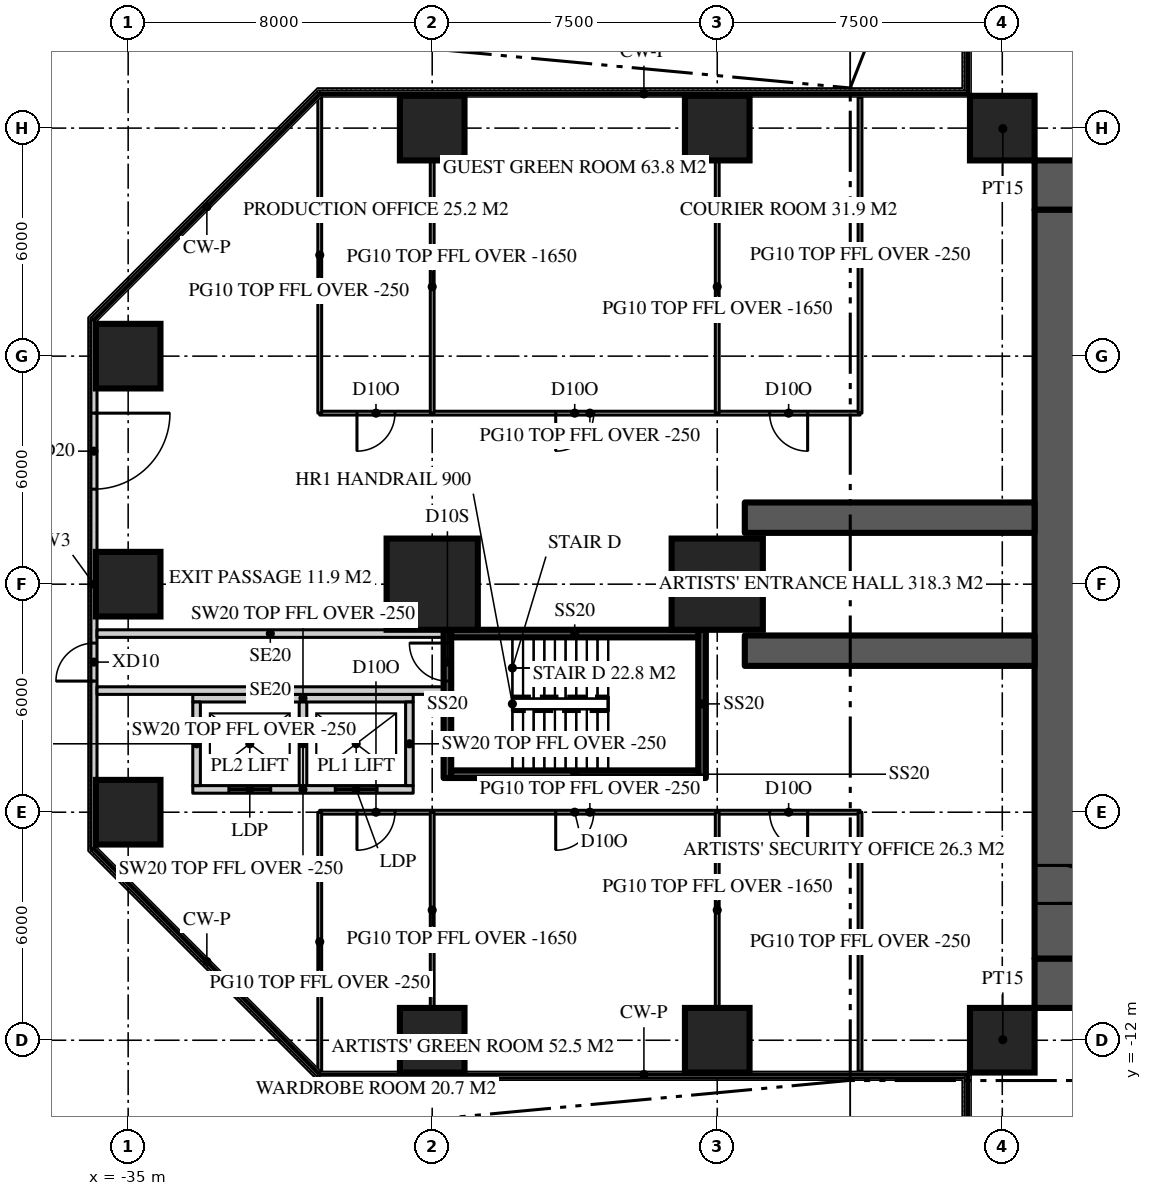
"""IFC4 building model, lengths in metres.
Left out: names, types, materials, properties, quantities, classifications, styles, units other than length and angle.
Written with IfcOpenShell. Run it as: python <this file> out.ifc"""

import sys

from ifc_helpers import new_model, si_unit, direction, frame, frame_2d, origin, origin_2d, place, context, subcontext, project, spatial, rectangle, extrude, element, fill, save


model = new_model("IFC4")
c1 = context("Model", 3, precision=1e-05, world=origin(), true_north=direction((0.0, 1.0)))
c2 = subcontext(c1, "Body", "Model", "MODEL_VIEW")
j1 = project(units=[si_unit("LENGTHUNIT", "METRE"), si_unit("PLANEANGLEUNIT", "RADIAN")], contexts=[c1])
p1 = place(None, origin())
s1 = spatial("IfcSite", under=j1, at=p1, CompositionType="ELEMENT")
p2 = place(p1, origin())
s2 = spatial("IfcBuilding", under=s1, at=p2, CompositionType="ELEMENT")
p3 = place(p2, origin())
s3 = spatial("IfcBuildingStorey", under=s2, at=p3, CompositionType="ELEMENT", Elevation=0.0)
p4 = place(p3, frame((-11.15, 10.5, 0.0), z_axis=(0.0, 0.0, 1.0), x_axis=(1.0, 0.0, 0.0)))
e1 = element("IfcWall", 1, at=p4, inside=s3, PredefinedType="SHEAR", context=c2, shape_type="SweptSolid", body=[
    extrude(rectangle(XDim=22.3, YDim=1.3, at=frame_2d((11.15, 0.0))), origin(), (0.0, 0.0, 1.0), 7.0),
])
p5 = place(p4, frame((4.25, 0.0, 0.0)))
e2 = element("IfcOpeningElement", 2, at=p5, cuts=e1, PredefinedType="OPENING", context=c2, shape_type="SweptSolid", body=[
    extrude(rectangle(XDim=1.8, YDim=2.2, at=frame_2d((0.9, 1.1))), frame((0.0, 0.66, 0.0), z_axis=(0.0, -1.0, 0.0), x_axis=(1.0, 0.0, 0.0)), (0.0, 0.0, 1.0), 1.32),
])
p6 = place(p4, frame((16.25, 0.0, 0.0)))
e3 = element("IfcOpeningElement", 3, at=p6, cuts=e1, PredefinedType="OPENING", context=c2, shape_type="SweptSolid", body=[
    extrude(rectangle(XDim=1.8, YDim=2.2, at=frame_2d((0.9, 1.1))), frame((0.0, 0.66, 0.0), z_axis=(0.0, -1.0, 0.0), x_axis=(1.0, 0.0, 0.0)), (0.0, 0.0, 1.0), 1.32),
])
p7 = place(p3, frame((11.15, -10.5, 0.0), z_axis=(0.0, 0.0, 1.0), x_axis=(-1.0, 0.0, 0.0)))
e4 = element("IfcWall", 4, at=p7, inside=s3, PredefinedType="SHEAR", context=c2, shape_type="SweptSolid", body=[
    extrude(rectangle(XDim=22.3, YDim=1.3, at=frame_2d((11.15, 0.0))), origin(), (0.0, 0.0, 1.0), 7.0),
])
p8 = place(p7, frame((16.25, 0.0, 0.0)))
e5 = element("IfcOpeningElement", 5, at=p8, cuts=e4, PredefinedType="OPENING", context=c2, shape_type="SweptSolid", body=[
    extrude(rectangle(XDim=1.8, YDim=2.2, at=frame_2d((0.9, 1.1))), frame((0.0, 0.66, 0.0), z_axis=(0.0, -1.0, 0.0), x_axis=(1.0, 0.0, 0.0)), (0.0, 0.0, 1.0), 1.32),
])
p9 = place(p7, frame((4.25, 0.0, 0.0)))
e6 = element("IfcOpeningElement", 6, at=p9, cuts=e4, PredefinedType="OPENING", context=c2, shape_type="SweptSolid", body=[
    extrude(rectangle(XDim=1.8, YDim=2.2, at=frame_2d((0.9, 1.1))), frame((0.0, 0.66, 0.0), z_axis=(0.0, -1.0, 0.0), x_axis=(1.0, 0.0, 0.0)), (0.0, 0.0, 1.0), 1.32),
])
p10 = place(p3, frame((-10.5, 9.85, 0.0), z_axis=(0.0, 0.0, 1.0), x_axis=(0.0, -1.0, 0.0)))
e7 = element("IfcWall", 7, at=p10, inside=s3, PredefinedType="SHEAR", context=c2, shape_type="SweptSolid", body=[
    extrude(rectangle(XDim=19.7, YDim=1.3, at=frame_2d((9.85, 0.0))), origin(), (0.0, 0.0, 1.0), 7.0),
])
p11 = place(p10, frame((17.25, 0.0, 0.0)))
e8 = element("IfcOpeningElement", 8, at=p11, cuts=e7, PredefinedType="OPENING", context=c2, shape_type="SweptSolid", body=[
    extrude(rectangle(XDim=1.0, YDim=2.2, at=frame_2d((0.5, 1.1))), frame((0.0, 0.66, 0.0), z_axis=(0.0, -1.0, 0.0), x_axis=(1.0, 0.0, 0.0)), (0.0, 0.0, 1.0), 1.32),
])
for number, where, z_axis, x_axis in (
    (9, (-11.15, 1.75, 0.0), (0.0, 0.0, 1.0), (-1.0, 0.0, 0.0)),
    (10, (-11.15, -1.75, 0.0), (0.0, 0.0, 1.0), (-1.0, 0.0, 0.0)),
):
    element("IfcWall", number, at=place(p3, frame(where, z_axis=z_axis, x_axis=x_axis)), inside=s3, PredefinedType="SHEAR", context=c2, shape_type="SweptSolid", body=[
        extrude(rectangle(XDim=7.625, YDim=0.8, at=frame_2d((3.812, 0.0))), origin(), (0.0, 0.0, 1.0), 7.0),
    ])
for number, where, z_axis, x_axis in (
    (11, (-27.0, -12.0, 0.0), (0.0, 0.0, 1.0), (1.0, 0.0, 0.0)),
    (12, (-19.5, -12.0, 0.0), (0.0, 0.0, 1.0), (1.0, 0.0, 0.0)),
    (13, (-12.0, -12.0, 0.0), (0.0, 0.0, 1.0), (1.0, 0.0, 0.0)),
    (14, (-35.0, -6.0, 0.0), (0.0, 0.0, 1.0), (1.0, 0.0, 0.0)),
    (15, (-35.0, 0.0, 0.0), (0.0, 0.0, 1.0), (1.0, 0.0, 0.0)),
):
    element("IfcColumn", number, at=place(p3, frame(where, z_axis=z_axis, x_axis=x_axis)), inside=s3, PredefinedType="COLUMN", context=c2, shape_type="SweptSolid", body=[
        extrude(rectangle(XDim=1.7, YDim=1.7, at=origin_2d()), origin(), (0.0, 0.0, 1.0), 7.0),
    ])
for number, where, z_axis, x_axis in (
    (16, (-27.0, 0.0, 0.0), (0.0, 0.0, 1.0), (1.0, 0.0, 0.0)),
    (17, (-19.5, 0.0, 0.0), (0.0, 0.0, 1.0), (1.0, 0.0, 0.0)),
):
    element("IfcColumn", number, at=place(p3, frame(where, z_axis=z_axis, x_axis=x_axis)), inside=s3, PredefinedType="COLUMN", context=c2, shape_type="SweptSolid", body=[
        extrude(rectangle(XDim=2.4, YDim=2.4, at=origin_2d()), origin(), (0.0, 0.0, 1.0), 7.0),
    ])
for number, where, z_axis, x_axis in (
    (18, (-35.0, 6.0, 0.0), (0.0, 0.0, 1.0), (1.0, 0.0, 0.0)),
    (19, (-27.0, 12.0, 0.0), (0.0, 0.0, 1.0), (1.0, 0.0, 0.0)),
    (20, (-19.5, 12.0, 0.0), (0.0, 0.0, 1.0), (1.0, 0.0, 0.0)),
    (21, (-12.0, 12.0, 0.0), (0.0, 0.0, 1.0), (1.0, 0.0, 0.0)),
):
    element("IfcColumn", number, at=place(p3, frame(where, z_axis=z_axis, x_axis=x_axis)), inside=s3, PredefinedType="COLUMN", context=c2, shape_type="SweptSolid", body=[
        extrude(rectangle(XDim=1.7, YDim=1.7, at=origin_2d()), origin(), (0.0, 0.0, 1.0), 7.0),
    ])
p12 = place(p3, frame((-35.9, 6.958, 0.0), z_axis=(0.0, 0.0, 1.0), x_axis=(0.0, -1.0, 0.0)))
e22 = element("IfcWall", 22, at=p12, inside=s3, PredefinedType="SOLIDWALL", context=c2, shape_type="SweptSolid", body=[
    extrude(rectangle(XDim=13.917, YDim=0.16, at=frame_2d((6.958, 0.0))), origin(), (0.0, 0.0, 1.0), 6.75),
])
p13 = place(p12, frame((2.458, 0.0, 0.0)))
e23 = element("IfcOpeningElement", 23, at=p13, cuts=e22, PredefinedType="OPENING", context=c2, shape_type="SweptSolid", body=[
    extrude(rectangle(XDim=2.0, YDim=2.7, at=frame_2d((1.0, 1.35))), frame((0.0, 0.09, 0.0), z_axis=(0.0, -1.0, 0.0), x_axis=(1.0, 0.0, 0.0)), (0.0, 0.0, 1.0), 0.18),
])
p14 = place(p12, frame((8.509, 0.0, 0.0)))
e24 = element("IfcOpeningElement", 24, at=p14, cuts=e22, PredefinedType="OPENING", context=c2, shape_type="SweptSolid", body=[
    extrude(rectangle(XDim=1.0, YDim=2.2, at=frame_2d((0.5, 1.1))), frame((0.0, 0.09, 0.0), z_axis=(0.0, -1.0, 0.0), x_axis=(1.0, 0.0, 0.0)), (0.0, 0.0, 1.0), 0.18),
])
p15 = place(p3, frame((-15.743, -6.0, 0.0), z_axis=(0.0, 0.0, 1.0), x_axis=(-1.0, 0.0, 0.0)))
e25 = element("IfcWall", 25, at=p15, inside=s3, PredefinedType="PARTITIONING", context=c2, shape_type="SweptSolid", body=[
    extrude(rectangle(XDim=14.216, YDim=0.1, at=frame_2d((7.108, 0.0))), origin(), (0.0, 0.0, 1.0), 6.75),
])
p16 = place(p15, frame((1.378, 0.0, 0.0)))
e26 = element("IfcOpeningElement", 26, at=p16, cuts=e25, PredefinedType="OPENING", context=c2, shape_type="SweptSolid", body=[
    extrude(rectangle(XDim=1.0, YDim=2.2, at=frame_2d((0.5, 1.1))), frame((0.0, 0.06, 0.0), z_axis=(0.0, -1.0, 0.0), x_axis=(1.0, 0.0, 0.0)), (0.0, 0.0, 1.0), 0.12),
])
p17 = place(p15, frame((7.007, 0.0, 0.0)))
e27 = element("IfcOpeningElement", 27, at=p17, cuts=e25, PredefinedType="OPENING", context=c2, shape_type="SweptSolid", body=[
    extrude(rectangle(XDim=1.0, YDim=2.2, at=frame_2d((0.5, 1.1))), frame((0.0, 0.06, 0.0), z_axis=(0.0, -1.0, 0.0), x_axis=(1.0, 0.0, 0.0)), (0.0, 0.0, 1.0), 0.12),
])
p18 = place(p15, frame((12.237, 0.0, 0.0)))
e28 = element("IfcOpeningElement", 28, at=p18, cuts=e25, PredefinedType="OPENING", context=c2, shape_type="SweptSolid", body=[
    extrude(rectangle(XDim=1.0, YDim=2.2, at=frame_2d((0.5, 1.1))), frame((0.0, 0.06, 0.0), z_axis=(0.0, -1.0, 0.0), x_axis=(1.0, 0.0, 0.0)), (0.0, 0.0, 1.0), 0.12),
])
p19 = place(p3, frame((-15.743, -6.0, 0.0), z_axis=(0.0, 0.0, 1.0), x_axis=(0.0, -1.0, 0.0)))
e29 = element("IfcWall", 29, at=p19, inside=s3, PredefinedType="PARTITIONING", context=c2, shape_type="SweptSolid", body=[
    extrude(rectangle(XDim=6.82, YDim=0.1, at=frame_2d((3.41, 0.0))), origin(), (0.0, 0.0, 1.0), 6.75),
])
for number, where, z_axis, x_axis in (
    (30, (-19.5, -6.0, 0.0), (0.0, 0.0, 1.0), (0.0, -1.0, 0.0)),
    (31, (-27.0, -6.0, 0.0), (0.0, 0.0, 1.0), (0.0, -1.0, 0.0)),
):
    element("IfcWall", number, at=place(p3, frame(where, z_axis=z_axis, x_axis=x_axis)), inside=s3, PredefinedType="PARTITIONING", context=c2, shape_type="SweptSolid", body=[
        extrude(rectangle(XDim=5.15, YDim=0.1, at=frame_2d((2.575, 0.0))), origin(), (0.0, 0.0, 1.0), 5.35),
    ])
p20 = place(p3, frame((-29.959, -6.0, 0.0), z_axis=(0.0, 0.0, 1.0), x_axis=(0.0, -1.0, 0.0)))
e32 = element("IfcWall", 32, at=p20, inside=s3, PredefinedType="PARTITIONING", context=c2, shape_type="SweptSolid", body=[
    extrude(rectangle(XDim=6.82, YDim=0.1, at=frame_2d((3.41, 0.0))), origin(), (0.0, 0.0, 1.0), 6.75),
])
p21 = place(p3, frame((-15.743, 4.5, 0.0), z_axis=(0.0, 0.0, 1.0), x_axis=(-1.0, 0.0, 0.0)))
e33 = element("IfcWall", 33, at=p21, inside=s3, PredefinedType="PARTITIONING", context=c2, shape_type="SweptSolid", body=[
    extrude(rectangle(XDim=14.216, YDim=0.1, at=frame_2d((7.108, 0.0))), origin(), (0.0, 0.0, 1.0), 6.75),
])
p22 = place(p21, frame((1.378, 0.0, 0.0)))
e34 = element("IfcOpeningElement", 34, at=p22, cuts=e33, PredefinedType="OPENING", context=c2, shape_type="SweptSolid", body=[
    extrude(rectangle(XDim=1.0, YDim=2.2, at=frame_2d((0.5, 1.1))), frame((0.0, 0.06, 0.0), z_axis=(0.0, -1.0, 0.0), x_axis=(1.0, 0.0, 0.0)), (0.0, 0.0, 1.0), 0.12),
])
p23 = place(p21, frame((7.007, 0.0, 0.0)))
e35 = element("IfcOpeningElement", 35, at=p23, cuts=e33, PredefinedType="OPENING", context=c2, shape_type="SweptSolid", body=[
    extrude(rectangle(XDim=1.0, YDim=2.2, at=frame_2d((0.5, 1.1))), frame((0.0, 0.06, 0.0), z_axis=(0.0, -1.0, 0.0), x_axis=(1.0, 0.0, 0.0)), (0.0, 0.0, 1.0), 0.12),
])
p24 = place(p21, frame((12.237, 0.0, 0.0)))
e36 = element("IfcOpeningElement", 36, at=p24, cuts=e33, PredefinedType="OPENING", context=c2, shape_type="SweptSolid", body=[
    extrude(rectangle(XDim=1.0, YDim=2.2, at=frame_2d((0.5, 1.1))), frame((0.0, 0.06, 0.0), z_axis=(0.0, -1.0, 0.0), x_axis=(1.0, 0.0, 0.0)), (0.0, 0.0, 1.0), 0.12),
])
p25 = place(p3, frame((-15.743, 4.5, 0.0), z_axis=(0.0, 0.0, 1.0), x_axis=(0.0, 1.0, 0.0)))
e37 = element("IfcWall", 37, at=p25, inside=s3, PredefinedType="PARTITIONING", context=c2, shape_type="SweptSolid", body=[
    extrude(rectangle(XDim=8.32, YDim=0.1, at=frame_2d((4.16, 0.0))), origin(), (0.0, 0.0, 1.0), 6.75),
])
for number, where, z_axis, x_axis in (
    (38, (-19.5, 4.5, 0.0), (0.0, 0.0, 1.0), (0.0, 1.0, 0.0)),
    (39, (-27.0, 4.5, 0.0), (0.0, 0.0, 1.0), (0.0, 1.0, 0.0)),
):
    element("IfcWall", number, at=place(p3, frame(where, z_axis=z_axis, x_axis=x_axis)), inside=s3, PredefinedType="PARTITIONING", context=c2, shape_type="SweptSolid", body=[
        extrude(rectangle(XDim=6.65, YDim=0.1, at=frame_2d((3.325, 0.0))), origin(), (0.0, 0.0, 1.0), 5.35),
    ])
p26 = place(p3, frame((-29.959, 4.5, 0.0), z_axis=(0.0, 0.0, 1.0), x_axis=(0.0, 1.0, 0.0)))
e40 = element("IfcWall", 40, at=p26, inside=s3, PredefinedType="PARTITIONING", context=c2, shape_type="SweptSolid", body=[
    extrude(rectangle(XDim=8.32, YDim=0.1, at=frame_2d((4.16, 0.0))), origin(), (0.0, 0.0, 1.0), 6.75),
])
for number, where, z_axis, x_axis in (
    (41, (-11.15, 11.15, 0.0), (0.0, 0.0, 1.0), (-0.707, 0.707, 0.0)),
    (42, (-11.15, -11.15, 0.0), (0.0, 0.0, 1.0), (-0.707, -0.707, 0.0)),
):
    element("IfcWall", number, at=place(p3, frame(where, z_axis=z_axis, x_axis=x_axis)), inside=s3, PredefinedType="PARTITIONING", context=c2, shape_type="SweptSolid", body=[
        extrude(rectangle(XDim=2.362, YDim=0.15, at=frame_2d((1.181, 0.0))), origin(), (0.0, 0.0, 1.0), 6.75),
    ])
p27 = place(p3, frame((-27.5, -3.0, 0.0), z_axis=(0.0, 0.0, 1.0), x_axis=(-1.0, 0.0, 0.0)))
e43 = element("IfcWall", 43, at=p27, inside=s3, PredefinedType="SOLIDWALL", context=c2, shape_type="SweptSolid", body=[
    extrude(rectangle(XDim=5.8, YDim=0.2, at=frame_2d((2.9, 0.0))), origin(), (0.0, 0.0, 1.0), 6.75),
])
p28 = place(p3, frame((-33.3, -5.4, 0.0), z_axis=(0.0, 0.0, 1.0), x_axis=(1.0, 0.0, 0.0)))
e44 = element("IfcWall", 44, at=p28, inside=s3, PredefinedType="SOLIDWALL", context=c2, shape_type="SweptSolid", body=[
    extrude(rectangle(XDim=5.8, YDim=0.2, at=frame_2d((2.9, 0.0))), origin(), (0.0, 0.0, 1.0), 6.75),
])
p29 = place(p28, frame((3.75, 0.0, 0.0)))
e45 = element("IfcOpeningElement", 45, at=p29, cuts=e44, PredefinedType="OPENING", context=c2, shape_type="SweptSolid", body=[
    extrude(rectangle(XDim=1.1, YDim=2.2, at=frame_2d((0.55, 1.1))), frame((0.0, 0.11, 0.0), z_axis=(0.0, -1.0, 0.0), x_axis=(1.0, 0.0, 0.0)), (0.0, 0.0, 1.0), 0.22),
])
p30 = place(p28, frame((0.95, 0.0, 0.0)))
e46 = element("IfcOpeningElement", 46, at=p30, cuts=e44, PredefinedType="OPENING", context=c2, shape_type="SweptSolid", body=[
    extrude(rectangle(XDim=1.1, YDim=2.2, at=frame_2d((0.55, 1.1))), frame((0.0, 0.11, 0.0), z_axis=(0.0, -1.0, 0.0), x_axis=(1.0, 0.0, 0.0)), (0.0, 0.0, 1.0), 0.22),
])
for number, where, z_axis, x_axis in (
    (47, (-27.6, -3.1, 0.0), (0.0, 0.0, 1.0), (0.0, -1.0, 0.0)),
    (48, (-30.4, -3.1, 0.0), (0.0, 0.0, 1.0), (0.0, -1.0, 0.0)),
    (49, (-33.2, -3.1, 0.0), (0.0, 0.0, 1.0), (0.0, -1.0, 0.0)),
):
    element("IfcWall", number, at=place(p3, frame(where, z_axis=z_axis, x_axis=x_axis)), inside=s3, PredefinedType="SOLIDWALL", context=c2, shape_type="SweptSolid", body=[
        extrude(rectangle(XDim=2.2, YDim=0.2, at=frame_2d((1.1, 0.0))), origin(), (0.0, 0.0, 1.0), 6.75),
    ])
p31 = place(p3, frame((-19.9, -1.2, 0.0), z_axis=(0.0, 0.0, 1.0), x_axis=(0.0, -1.0, 0.0)))
e50 = element("IfcWall", 50, at=p31, inside=s3, PredefinedType="SOLIDWALL", context=c2, shape_type="SweptSolid", body=[
    extrude(rectangle(XDim=3.9, YDim=0.2, at=frame_2d((1.95, 0.0))), origin(), (0.0, 0.0, 1.0), 6.75),
])
p32 = place(p3, frame((-26.6, -5.1, 0.0), z_axis=(0.0, 0.0, 1.0), x_axis=(0.0, 1.0, 0.0)))
e51 = element("IfcWall", 51, at=p32, inside=s3, PredefinedType="SOLIDWALL", context=c2, shape_type="SweptSolid", body=[
    extrude(rectangle(XDim=3.9, YDim=0.2, at=frame_2d((1.95, 0.0))), origin(), (0.0, 0.0, 1.0), 6.75),
])
p33 = place(p32, frame((2.55, 0.0, 0.0)))
e52 = element("IfcOpeningElement", 52, at=p33, cuts=e51, PredefinedType="OPENING", context=c2, shape_type="SweptSolid", body=[
    extrude(rectangle(XDim=1.0, YDim=2.2, at=frame_2d((0.5, 1.1))), frame((0.0, 0.11, 0.0), z_axis=(0.0, -1.0, 0.0), x_axis=(1.0, 0.0, 0.0)), (0.0, 0.0, 1.0), 0.22),
])
for number, where, z_axis, x_axis in (
    (53, (-20.0, -1.3, 0.0), (0.0, 0.0, 1.0), (-1.0, 0.0, 0.0)),
    (54, (-26.5, -5.0, 0.0), (0.0, 0.0, 1.0), (1.0, 0.0, 0.0)),
):
    element("IfcWall", number, at=place(p3, frame(where, z_axis=z_axis, x_axis=x_axis)), inside=s3, PredefinedType="SOLIDWALL", context=c2, shape_type="SweptSolid", body=[
        extrude(rectangle(XDim=6.5, YDim=0.2, at=frame_2d((3.25, 0.0))), origin(), (0.0, 0.0, 1.0), 6.75),
    ])
for number, where, z_axis, x_axis in (
    (55, (-26.7, -1.3, 0.0), (0.0, 0.0, 1.0), (-1.0, 0.0, 0.0)),
    (56, (-26.7, -2.8, 0.0), (0.0, 0.0, 1.0), (-1.0, 0.0, 0.0)),
):
    element("IfcWall", number, at=place(p3, frame(where, z_axis=z_axis, x_axis=x_axis)), inside=s3, PredefinedType="SOLIDWALL", context=c2, shape_type="SweptSolid", body=[
        extrude(rectangle(XDim=9.12, YDim=0.2, at=frame_2d((4.56, 0.0))), origin(), (0.0, 0.0, 1.0), 6.75),
    ])
p34 = place(p13, origin())
e57 = element("IfcDoor", 57, at=p34, inside=s3, OperationType="DOUBLE_DOOR_DOUBLE_SWING", PredefinedType="DOOR", context=c2, shape_type="SweptSolid", body=[
    extrude(rectangle(XDim=2.0, YDim=2.7, at=frame_2d((1.0, 1.35))), frame((0.0, 0.025, 0.0), z_axis=(0.0, -1.0, 0.0), x_axis=(1.0, 0.0, 0.0)), (0.0, 0.0, 1.0), 0.05),
])
fill(e23, e57)
p35 = place(p14, frame((1.0, 0.0, 0.0), z_axis=(0.0, 0.0, 1.0), x_axis=(-1.0, 0.0, 0.0)))
e58 = element("IfcDoor", 58, at=p35, inside=s3, OperationType="SINGLE_SWING_LEFT", PredefinedType="DOOR", context=c2, shape_type="SweptSolid", body=[
    extrude(rectangle(XDim=1.0, YDim=2.2, at=frame_2d((0.5, 1.1))), frame((0.0, 0.025, 0.0), z_axis=(0.0, -1.0, 0.0), x_axis=(1.0, 0.0, 0.0)), (0.0, 0.0, 1.0), 0.05),
])
fill(e24, e58)
p36 = place(p29, origin())
e59 = element("IfcDoor", 59, at=p36, inside=s3, OperationType="SLIDING_TO_LEFT", PredefinedType="DOOR", context=c2, shape_type="SweptSolid", body=[
    extrude(rectangle(XDim=1.1, YDim=2.2, at=frame_2d((0.55, 1.1))), frame((0.0, 0.025, 0.0), z_axis=(0.0, -1.0, 0.0), x_axis=(1.0, 0.0, 0.0)), (0.0, 0.0, 1.0), 0.05),
])
fill(e45, e59)
p37 = place(p30, origin())
e60 = element("IfcDoor", 60, at=p37, inside=s3, OperationType="SLIDING_TO_LEFT", PredefinedType="DOOR", context=c2, shape_type="SweptSolid", body=[
    extrude(rectangle(XDim=1.1, YDim=2.2, at=frame_2d((0.55, 1.1))), frame((0.0, 0.025, 0.0), z_axis=(0.0, -1.0, 0.0), x_axis=(1.0, 0.0, 0.0)), (0.0, 0.0, 1.0), 0.05),
])
fill(e46, e60)
p38 = place(p11, origin())
e61 = element("IfcDoor", 61, at=p38, inside=s3, OperationType="SINGLE_SWING_RIGHT", PredefinedType="DOOR", context=c2, shape_type="SweptSolid", body=[
    extrude(rectangle(XDim=1.0, YDim=2.2, at=frame_2d((0.5, 1.1))), frame((0.0, 0.025, 0.0), z_axis=(0.0, -1.0, 0.0), x_axis=(1.0, 0.0, 0.0)), (0.0, 0.0, 1.0), 0.05),
])
fill(e8, e61)
p39 = place(p16, origin())
e62 = element("IfcDoor", 62, at=p39, inside=s3, OperationType="SINGLE_SWING_LEFT", PredefinedType="DOOR", context=c2, shape_type="SweptSolid", body=[
    extrude(rectangle(XDim=1.0, YDim=2.2, at=frame_2d((0.5, 1.1))), frame((0.0, 0.025, 0.0), z_axis=(0.0, -1.0, 0.0), x_axis=(1.0, 0.0, 0.0)), (0.0, 0.0, 1.0), 0.05),
])
fill(e26, e62)
p40 = place(p17, origin())
e63 = element("IfcDoor", 63, at=p40, inside=s3, OperationType="SINGLE_SWING_RIGHT", PredefinedType="DOOR", context=c2, shape_type="SweptSolid", body=[
    extrude(rectangle(XDim=1.0, YDim=2.2, at=frame_2d((0.5, 1.1))), frame((0.0, 0.025, 0.0), z_axis=(0.0, -1.0, 0.0), x_axis=(1.0, 0.0, 0.0)), (0.0, 0.0, 1.0), 0.05),
])
fill(e27, e63)
p41 = place(p18, origin())
e64 = element("IfcDoor", 64, at=p41, inside=s3, OperationType="SINGLE_SWING_RIGHT", PredefinedType="DOOR", context=c2, shape_type="SweptSolid", body=[
    extrude(rectangle(XDim=1.0, YDim=2.2, at=frame_2d((0.5, 1.1))), frame((0.0, 0.025, 0.0), z_axis=(0.0, -1.0, 0.0), x_axis=(1.0, 0.0, 0.0)), (0.0, 0.0, 1.0), 0.05),
])
fill(e28, e64)
p42 = place(p22, origin())
e65 = element("IfcDoor", 65, at=p42, inside=s3, OperationType="SINGLE_SWING_LEFT", PredefinedType="DOOR", context=c2, shape_type="SweptSolid", body=[
    extrude(rectangle(XDim=1.0, YDim=2.2, at=frame_2d((0.5, 1.1))), frame((0.0, 0.025, 0.0), z_axis=(0.0, -1.0, 0.0), x_axis=(1.0, 0.0, 0.0)), (0.0, 0.0, 1.0), 0.05),
])
fill(e34, e65)
p43 = place(p23, origin())
e66 = element("IfcDoor", 66, at=p43, inside=s3, OperationType="SINGLE_SWING_RIGHT", PredefinedType="DOOR", context=c2, shape_type="SweptSolid", body=[
    extrude(rectangle(XDim=1.0, YDim=2.2, at=frame_2d((0.5, 1.1))), frame((0.0, 0.025, 0.0), z_axis=(0.0, -1.0, 0.0), x_axis=(1.0, 0.0, 0.0)), (0.0, 0.0, 1.0), 0.05),
])
fill(e35, e66)
p44 = place(p24, origin())
e67 = element("IfcDoor", 67, at=p44, inside=s3, OperationType="SINGLE_SWING_RIGHT", PredefinedType="DOOR", context=c2, shape_type="SweptSolid", body=[
    extrude(rectangle(XDim=1.0, YDim=2.2, at=frame_2d((0.5, 1.1))), frame((0.0, 0.025, 0.0), z_axis=(0.0, -1.0, 0.0), x_axis=(1.0, 0.0, 0.0)), (0.0, 0.0, 1.0), 0.05),
])
fill(e36, e67)
p45 = place(p33, origin())
e68 = element("IfcDoor", 68, at=p45, inside=s3, OperationType="SINGLE_SWING_RIGHT", PredefinedType="DOOR", context=c2, shape_type="SweptSolid", body=[
    extrude(rectangle(XDim=1.0, YDim=2.2, at=frame_2d((0.5, 1.1))), frame((0.0, 0.025, 0.0), z_axis=(0.0, -1.0, 0.0), x_axis=(1.0, 0.0, 0.0)), (0.0, 0.0, 1.0), 0.05),
])
fill(e52, e68)
save(model, sys.argv[1])
